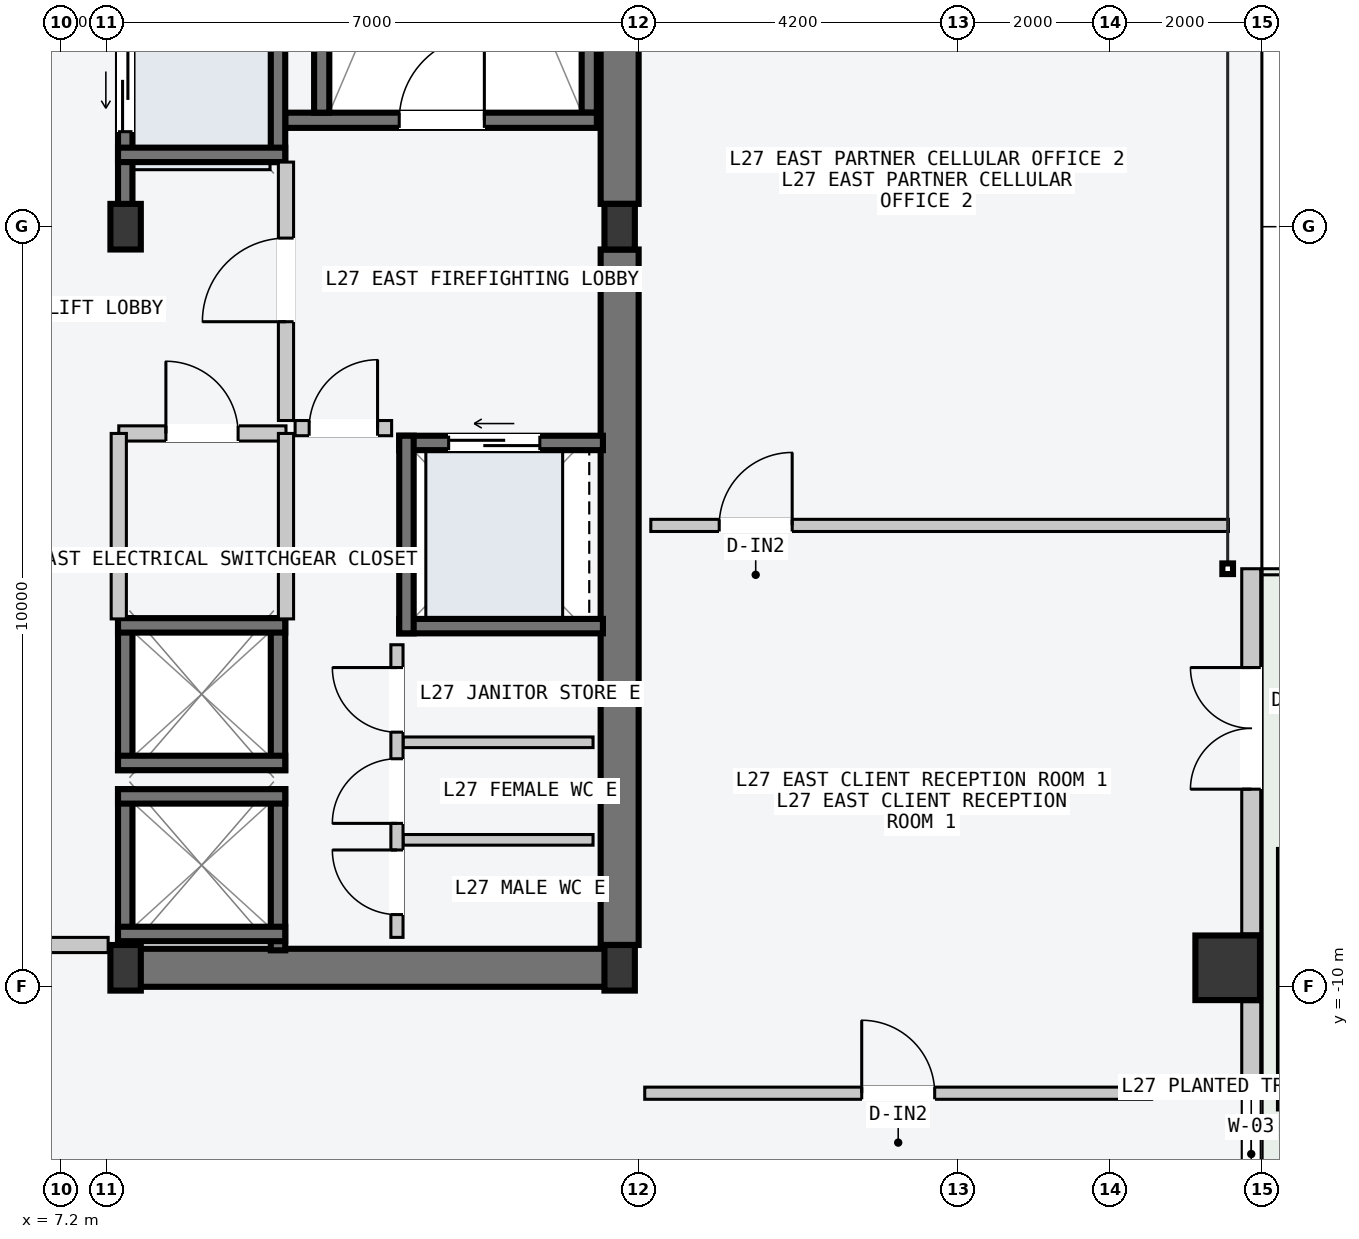
"""IFC4 building model, lengths in metres.
Left out: names, types, materials, properties, quantities, classifications, styles, units other than length and angle.
Written with IfcOpenShell. Run it as: python <this file> out.ifc"""

import sys

from ifc_helpers import new_model, si_unit, direction, frame, frame_2d, origin, origin_2d, place, context, subcontext, project, spatial, rectangle, hollow_rectangle, i_section, extrude, element, fill, save


model = new_model("IFC4")
c1 = context("Model", 3, precision=1e-05, world=origin(), true_north=direction((0.0, 1.0)))
c2 = subcontext(c1, "Body", "Model", "MODEL_VIEW")
j1 = project(units=[si_unit("LENGTHUNIT", "METRE"), si_unit("PLANEANGLEUNIT", "RADIAN")], contexts=[c1])
p1 = place(None, origin())
s1 = spatial("IfcSite", under=j1, at=p1, CompositionType="ELEMENT")
p2 = place(p1, origin())
s2 = spatial("IfcBuilding", under=s1, at=p2, CompositionType="ELEMENT")
p3 = place(p2, frame((0.0, 0.0, 106.2)))
s3 = spatial("IfcBuildingStorey", under=s2, at=p3, CompositionType="ELEMENT", Elevation=106.2)
p4 = place(p3, frame((8.07, -9.75, -0.2), z_axis=(0.0, 0.0, 1.0), x_axis=(1.0, 0.0, 0.0)))
e1 = element("IfcWall", 1, at=p4, inside=s3, PredefinedType="SHEAR", context=c2, shape_type="SweptSolid", body=[
    extrude(rectangle(XDim=6.46, YDim=0.5, at=frame_2d((3.23, 0.0))), origin(), (0.0, 0.0, 1.0), 3.6),
])
for number, where, z_axis, x_axis in (
    (2, (14.55, -9.45, -0.2), (0.0, 0.0, 1.0), (0.0, 1.0, 0.0)),
    (3, (14.55, 0.3, -0.2), (0.0, 0.0, 1.0), (0.0, 1.0, 0.0)),
):
    element("IfcWall", number, at=place(p3, frame(where, z_axis=z_axis, x_axis=x_axis)), inside=s3, PredefinedType="SHEAR", context=c2, shape_type="SweptSolid", body=[
        extrude(rectangle(XDim=9.15, YDim=0.5, at=frame_2d((4.575, 0.0))), origin(), (0.0, 0.0, 1.0), 3.6),
    ])
p5 = place(p3, frame((14.15, 1.5, -0.2), z_axis=(0.0, 0.0, 1.0), x_axis=(0.0, 1.0, 0.0)))
e4 = element("IfcWall", 4, at=p5, inside=s3, PredefinedType="SOLIDWALL", context=c2, shape_type="SweptSolid", body=[
    extrude(rectangle(XDim=7.8, YDim=0.2, at=frame_2d((3.9, 0.0))), origin(), (0.0, 0.0, 1.0), 3.6),
])
p6 = place(p3, frame((10.15, 1.4, -0.2), z_axis=(0.0, 0.0, 1.0), x_axis=(1.0, 0.0, 0.0)))
e5 = element("IfcWall", 5, at=p6, inside=s3, PredefinedType="SOLIDWALL", context=c2, shape_type="SweptSolid", body=[
    extrude(rectangle(XDim=4.1, YDim=0.2, at=frame_2d((2.05, 0.0))), origin(), (0.0, 0.0, 1.0), 3.6),
])
p7 = place(p6, frame((1.5, 0.0, 0.2)))
e6 = element("IfcOpeningElement", 6, at=p7, cuts=e5, PredefinedType="OPENING", context=c2, shape_type="SweptSolid", body=[
    extrude(rectangle(XDim=1.12, YDim=2.18, at=frame_2d((0.56, 1.09))), frame((0.0, 0.11, 0.0), z_axis=(0.0, -1.0, 0.0), x_axis=(1.0, 0.0, 0.0)), (0.0, 0.0, 1.0), 0.22),
])
p8 = place(p3, frame((10.63, 1.5, -0.2), z_axis=(0.0, 0.0, 1.0), x_axis=(0.0, 1.0, 0.0)))
e7 = element("IfcWall", 7, at=p8, inside=s3, PredefinedType="SOLIDWALL", context=c2, shape_type="SweptSolid", body=[
    extrude(rectangle(XDim=7.8, YDim=0.2, at=frame_2d((3.9, 0.0))), origin(), (0.0, 0.0, 1.0), 3.6),
])
for number, where, z_axis, x_axis in (
    (8, (8.05, -9.75, 0.0), (0.0, 0.0, 1.0), (1.0, 0.0, 0.0)),
    (9, (8.05, 0.0, 0.0), (0.0, 0.0, 1.0), (1.0, 0.0, 0.0)),
    (10, (14.55, -9.75, 0.0), (0.0, 0.0, 1.0), (1.0, 0.0, 0.0)),
    (11, (14.55, 0.0, 0.0), (0.0, 0.0, 1.0), (1.0, 0.0, 0.0)),
):
    element("IfcColumn", number, at=place(p3, frame(where, z_axis=z_axis, x_axis=x_axis)), inside=s3, PredefinedType="COLUMN", context=c2, shape_type="SweptSolid", body=[
        extrude(i_section(OverallWidth=0.4, OverallDepth=0.6, WebThickness=0.022, FlangeThickness=0.036, at=origin_2d()), origin(), (0.0, 0.0, 1.0), 3.6),
    ])
p9 = place(p3, frame((22.55, -9.75, 0.0), z_axis=(0.0, 0.0, 1.0), x_axis=(0.0, 1.0, 0.0)))
e12 = element("IfcColumn", 12, at=p9, inside=s3, PredefinedType="COLUMN", context=c2, shape_type="SweptSolid", body=[
    extrude(hollow_rectangle(XDim=0.85, YDim=0.85, WallThickness=0.04, at=origin_2d()), origin(), (0.0, 0.0, 1.0), 3.6),
])
p10 = place(p3, frame((22.86, -14.605, 0.0), z_axis=(0.0, 0.0, 1.0), x_axis=(0.0, 1.0, 0.0)))
e13 = element("IfcWall", 13, at=p10, inside=s3, PredefinedType="STANDARD", context=c2, shape_type="SweptSolid", body=[
    extrude(rectangle(XDim=4.41, YDim=0.25, at=frame_2d((2.205, 0.0))), origin(), (0.0, 0.0, 1.0), 3.4),
])
p11 = place(p10, frame((1.405, 0.0, 0.85)))
e14 = element("IfcOpeningElement", 14, at=p11, cuts=e13, PredefinedType="OPENING", context=c2, shape_type="SweptSolid", body=[
    extrude(rectangle(XDim=2.0, YDim=2.1, at=frame_2d((1.0, 1.05))), frame((0.0, 0.135, 0.0), z_axis=(0.0, -1.0, 0.0), x_axis=(1.0, 0.0, 0.0)), (0.0, 0.0, 1.0), 0.27),
])
p12 = place(p3, frame((22.86, -9.305, 0.0), z_axis=(0.0, 0.0, 1.0), x_axis=(0.0, 1.0, 0.0)))
e15 = element("IfcWall", 15, at=p12, inside=s3, PredefinedType="STANDARD", context=c2, shape_type="SweptSolid", body=[
    extrude(rectangle(XDim=4.805, YDim=0.25, at=frame_2d((2.402, 0.0))), origin(), (0.0, 0.0, 1.0), 3.4),
])
p13 = place(p12, frame((1.905, 0.0, 0.0)))
e16 = element("IfcOpeningElement", 16, at=p13, cuts=e15, PredefinedType="OPENING", context=c2, shape_type="SweptSolid", body=[
    extrude(rectangle(XDim=1.6, YDim=2.2, at=frame_2d((0.8, 1.1))), frame((0.0, 0.135, 0.0), z_axis=(0.0, -1.0, 0.0), x_axis=(1.0, 0.0, 0.0)), (0.0, 0.0, 1.0), 0.27),
])
p14 = place(p3, frame((8.045, 0.21, -0.2), z_axis=(0.0, 0.0, 1.0), x_axis=(0.0, 1.0, 0.0)))
e17 = element("IfcWall", 17, at=p14, inside=s3, PredefinedType="SOLIDWALL", context=c2, shape_type="SweptSolid", body=[
    extrude(rectangle(XDim=2.54, YDim=0.19, at=frame_2d((1.27, 0.0))), origin(), (0.0, 0.0, 1.0), 3.6),
])
p15 = place(p14, frame((1.04, 0.0, 0.2)))
e18 = element("IfcOpeningElement", 18, at=p15, cuts=e17, PredefinedType="OPENING", context=c2, shape_type="SweptSolid", body=[
    extrude(rectangle(XDim=1.1, YDim=2.2, at=frame_2d((0.55, 1.1))), frame((0.0, 0.105, 0.0), z_axis=(0.0, -1.0, 0.0), x_axis=(1.0, 0.0, 0.0)), (0.0, 0.0, 1.0), 0.21),
])
p16 = place(p3, frame((10.055, 0.85, -0.2), z_axis=(0.0, 0.0, 1.0), x_axis=(0.0, 1.0, 0.0)))
e19 = element("IfcWall", 19, at=p16, inside=s3, PredefinedType="SOLIDWALL", context=c2, shape_type="SweptSolid", body=[
    extrude(rectangle(XDim=1.9, YDim=0.19, at=frame_2d((0.95, 0.0))), origin(), (0.0, 0.0, 1.0), 3.6),
])
p17 = place(p3, frame((7.95, 0.945, -0.2), z_axis=(0.0, 0.0, 1.0), x_axis=(1.0, 0.0, 0.0)))
e20 = element("IfcWall", 20, at=p17, inside=s3, PredefinedType="SOLIDWALL", context=c2, shape_type="SweptSolid", body=[
    extrude(rectangle(XDim=2.2, YDim=0.19, at=frame_2d((1.1, 0.0))), origin(), (0.0, 0.0, 1.0), 3.6),
])
for number, where, z_axis, x_axis in (
    (21, (8.045, -9.52, -0.2), (0.0, 0.0, 1.0), (0.0, 1.0, 0.0)),
    (22, (10.055, -9.52, -0.2), (0.0, 0.0, 1.0), (0.0, 1.0, 0.0)),
):
    element("IfcWall", number, at=place(p3, frame(where, z_axis=z_axis, x_axis=x_axis)), inside=s3, PredefinedType="SOLIDWALL", context=c2, shape_type="SweptSolid", body=[
        extrude(rectangle(XDim=2.12, YDim=0.19, at=frame_2d((1.06, 0.0))), origin(), (0.0, 0.0, 1.0), 3.6),
    ])
for number, where, z_axis, x_axis in (
    (23, (7.95, -7.495, -0.2), (0.0, 0.0, 1.0), (1.0, 0.0, 0.0)),
    (24, (7.95, -9.305, -0.2), (0.0, 0.0, 1.0), (1.0, 0.0, 0.0)),
):
    element("IfcWall", number, at=place(p3, frame(where, z_axis=z_axis, x_axis=x_axis)), inside=s3, PredefinedType="SOLIDWALL", context=c2, shape_type="SweptSolid", body=[
        extrude(rectangle(XDim=2.2, YDim=0.19, at=frame_2d((1.1, 0.0))), origin(), (0.0, 0.0, 1.0), 3.6),
    ])
for number, where, z_axis, x_axis in (
    (25, (8.045, -7.15, -0.2), (0.0, 0.0, 1.0), (0.0, 1.0, 0.0)),
    (26, (10.055, -7.15, -0.2), (0.0, 0.0, 1.0), (0.0, 1.0, 0.0)),
):
    element("IfcWall", number, at=place(p3, frame(where, z_axis=z_axis, x_axis=x_axis)), inside=s3, PredefinedType="SOLIDWALL", context=c2, shape_type="SweptSolid", body=[
        extrude(rectangle(XDim=2.0, YDim=0.19, at=frame_2d((1.0, 0.0))), origin(), (0.0, 0.0, 1.0), 3.6),
    ])
for number, where, z_axis, x_axis in (
    (27, (7.95, -5.245, -0.2), (0.0, 0.0, 1.0), (1.0, 0.0, 0.0)),
    (28, (7.95, -7.055, -0.2), (0.0, 0.0, 1.0), (1.0, 0.0, 0.0)),
):
    element("IfcWall", number, at=place(p3, frame(where, z_axis=z_axis, x_axis=x_axis)), inside=s3, PredefinedType="SOLIDWALL", context=c2, shape_type="SweptSolid", body=[
        extrude(rectangle(XDim=2.2, YDim=0.19, at=frame_2d((1.1, 0.0))), origin(), (0.0, 0.0, 1.0), 3.6),
    ])
p18 = place(p3, frame((11.65, -2.845, -0.2), z_axis=(0.0, 0.0, 1.0), x_axis=(1.0, 0.0, 0.0)))
e29 = element("IfcWall", 29, at=p18, inside=s3, PredefinedType="SOLIDWALL", context=c2, shape_type="SweptSolid", body=[
    extrude(rectangle(XDim=2.68, YDim=0.19, at=frame_2d((1.34, 0.0))), origin(), (0.0, 0.0, 1.0), 3.6),
])
p19 = place(p18, frame((0.65, 0.0, 0.2)))
e30 = element("IfcOpeningElement", 30, at=p19, cuts=e29, PredefinedType="OPENING", context=c2, shape_type="SweptSolid", body=[
    extrude(rectangle(XDim=1.2, YDim=2.2, at=frame_2d((0.6, 1.1))), frame((0.0, 0.105, 0.0), z_axis=(0.0, -1.0, 0.0), x_axis=(1.0, 0.0, 0.0)), (0.0, 0.0, 1.0), 0.21),
])
p20 = place(p3, frame((11.65, -5.255, -0.2), z_axis=(0.0, 0.0, 1.0), x_axis=(1.0, 0.0, 0.0)))
e31 = element("IfcWall", 31, at=p20, inside=s3, PredefinedType="SOLIDWALL", context=c2, shape_type="SweptSolid", body=[
    extrude(rectangle(XDim=2.68, YDim=0.19, at=frame_2d((1.34, 0.0))), origin(), (0.0, 0.0, 1.0), 3.6),
])
p21 = place(p3, frame((11.745, -5.35, -0.2), z_axis=(0.0, 0.0, 1.0), x_axis=(0.0, 1.0, 0.0)))
e32 = element("IfcWall", 32, at=p21, inside=s3, PredefinedType="SOLIDWALL", context=c2, shape_type="SweptSolid", body=[
    extrude(rectangle(XDim=2.6, YDim=0.19, at=frame_2d((1.3, 0.0))), origin(), (0.0, 0.0, 1.0), 3.6),
])
p22 = place(p3, frame((6.02, -9.45, 0.0), z_axis=(0.0, 0.0, 1.0), x_axis=(1.0, 0.0, 0.0)))
e33 = element("IfcWall", 33, at=p22, inside=s3, PredefinedType="PARTITIONING", context=c2, shape_type="SweptSolid", body=[
    extrude(rectangle(XDim=1.8, YDim=0.2, at=frame_2d((0.9, 0.0))), origin(), (0.0, 0.0, 1.0), 3.4),
])
p23 = place(p3, frame((10.16, -2.55, 0.0), z_axis=(0.0, 0.0, 1.0), x_axis=(0.0, 1.0, 0.0)))
e34 = element("IfcWall", 34, at=p23, inside=s3, PredefinedType="PARTITIONING", context=c2, shape_type="SweptSolid", body=[
    extrude(rectangle(XDim=3.4, YDim=0.2, at=frame_2d((1.7, 0.0))), origin(), (0.0, 0.0, 1.0), 3.4),
])
p24 = place(p23, frame((1.3, 0.0, 0.0)))
e35 = element("IfcOpeningElement", 35, at=p24, cuts=e34, PredefinedType="OPENING", context=c2, shape_type="SweptSolid", body=[
    extrude(rectangle(XDim=1.1, YDim=2.15, at=frame_2d((0.55, 1.075))), frame((0.0, 0.11, 0.0), z_axis=(0.0, -1.0, 0.0), x_axis=(1.0, 0.0, 0.0)), (0.0, 0.0, 1.0), 0.22),
])
p25 = place(p3, frame((10.28, -2.65, 0.0), z_axis=(0.0, 0.0, 1.0), x_axis=(1.0, 0.0, 0.0)))
e36 = element("IfcWall", 36, at=p25, inside=s3, PredefinedType="PARTITIONING", context=c2, shape_type="SweptSolid", body=[
    extrude(rectangle(XDim=1.27, YDim=0.2, at=frame_2d((0.635, 0.0))), origin(), (0.0, 0.0, 1.0), 3.4),
])
p26 = place(p25, frame((0.185, 0.0, 0.0)))
e37 = element("IfcOpeningElement", 37, at=p26, cuts=e36, PredefinedType="OPENING", context=c2, shape_type="SweptSolid", body=[
    extrude(rectangle(XDim=0.9, YDim=2.15, at=frame_2d((0.45, 1.075))), frame((0.0, 0.11, 0.0), z_axis=(0.0, -1.0, 0.0), x_axis=(1.0, 0.0, 0.0)), (0.0, 0.0, 1.0), 0.22),
])
p27 = place(p3, frame((7.96, -2.72, 0.0), z_axis=(0.0, 0.0, 1.0), x_axis=(1.0, 0.0, 0.0)))
e38 = element("IfcWall", 38, at=p27, inside=s3, PredefinedType="PARTITIONING", context=c2, shape_type="SweptSolid", body=[
    extrude(rectangle(XDim=2.2, YDim=0.2, at=frame_2d((1.1, 0.0))), origin(), (0.0, 0.0, 1.0), 3.4),
])
p28 = place(p27, frame((0.62, 0.0, 0.0)))
e39 = element("IfcOpeningElement", 39, at=p28, cuts=e38, PredefinedType="OPENING", context=c2, shape_type="SweptSolid", body=[
    extrude(rectangle(XDim=0.95, YDim=2.1, at=frame_2d((0.475, 1.05))), frame((0.0, 0.11, 0.0), z_axis=(0.0, -1.0, 0.0), x_axis=(1.0, 0.0, 0.0)), (0.0, 0.0, 1.0), 0.22),
])
for number, where, z_axis, x_axis in (
    (40, (7.96, -5.16, 0.0), (0.0, 0.0, 1.0), (0.0, 1.0, 0.0)),
    (41, (10.16, -5.16, 0.0), (0.0, 0.0, 1.0), (0.0, 1.0, 0.0)),
):
    element("IfcWall", number, at=place(p3, frame(where, z_axis=z_axis, x_axis=x_axis)), inside=s3, PredefinedType="PARTITIONING", context=c2, shape_type="SweptSolid", body=[
        extrude(rectangle(XDim=2.44, YDim=0.2, at=frame_2d((1.22, 0.0))), origin(), (0.0, 0.0, 1.0), 3.4),
    ])
for number, where, z_axis, x_axis in (
    (42, (11.7, -8.067, 0.0), (0.0, 0.0, 1.0), (1.0, 0.0, 0.0)),
    (43, (11.7, -6.783, 0.0), (0.0, 0.0, 1.0), (1.0, 0.0, 0.0)),
):
    element("IfcWall", number, at=place(p3, frame(where, z_axis=z_axis, x_axis=x_axis)), inside=s3, PredefinedType="PARTITIONING", context=c2, shape_type="SweptSolid", body=[
        extrude(rectangle(XDim=2.5, YDim=0.14, at=frame_2d((1.25, 0.0))), origin(), (0.0, 0.0, 1.0), 3.4),
    ])
p29 = place(p3, frame((11.62, -9.35, 0.0), z_axis=(0.0, 0.0, 1.0), x_axis=(0.0, 1.0, 0.0)))
e44 = element("IfcWall", 44, at=p29, inside=s3, PredefinedType="PARTITIONING", context=c2, shape_type="SweptSolid", body=[
    extrude(rectangle(XDim=3.85, YDim=0.16, at=frame_2d((1.925, 0.0))), origin(), (0.0, 0.0, 1.0), 3.4),
])
p30 = place(p29, frame((0.3, 0.0, 0.0)))
e45 = element("IfcOpeningElement", 45, at=p30, cuts=e44, PredefinedType="OPENING", context=c2, shape_type="SweptSolid", body=[
    extrude(rectangle(XDim=0.85, YDim=2.12, at=frame_2d((0.425, 1.06))), frame((0.0, 0.09, 0.0), z_axis=(0.0, -1.0, 0.0), x_axis=(1.0, 0.0, 0.0)), (0.0, 0.0, 1.0), 0.18),
])
p31 = place(p29, frame((1.5, 0.0, 0.0)))
e46 = element("IfcOpeningElement", 46, at=p31, cuts=e44, PredefinedType="OPENING", context=c2, shape_type="SweptSolid", body=[
    extrude(rectangle(XDim=0.85, YDim=2.12, at=frame_2d((0.425, 1.06))), frame((0.0, 0.09, 0.0), z_axis=(0.0, -1.0, 0.0), x_axis=(1.0, 0.0, 0.0)), (0.0, 0.0, 1.0), 0.18),
])
p32 = place(p29, frame((2.7, 0.0, 0.0)))
e47 = element("IfcOpeningElement", 47, at=p32, cuts=e44, PredefinedType="OPENING", context=c2, shape_type="SweptSolid", body=[
    extrude(rectangle(XDim=0.85, YDim=2.12, at=frame_2d((0.425, 1.06))), frame((0.0, 0.09, 0.0), z_axis=(0.0, -1.0, 0.0), x_axis=(1.0, 0.0, 0.0)), (0.0, 0.0, 1.0), 0.18),
])
p33 = place(p3, frame((14.88, -11.4, 0.0), z_axis=(0.0, 0.0, 1.0), x_axis=(1.0, 0.0, 0.0)))
e48 = element("IfcWall", 48, at=p33, inside=s3, PredefinedType="PARTITIONING", context=c2, shape_type="SweptSolid", body=[
    extrude(rectangle(XDim=6.67, YDim=0.16, at=frame_2d((3.335, 0.0))), origin(), (0.0, 0.0, 1.0), 3.4),
])
p34 = place(p33, frame((2.855, 0.0, 0.0)))
e49 = element("IfcOpeningElement", 49, at=p34, cuts=e48, PredefinedType="OPENING", context=c2, shape_type="SweptSolid", body=[
    extrude(rectangle(XDim=0.96, YDim=2.18, at=frame_2d((0.48, 1.09))), frame((0.0, 0.09, 0.0), z_axis=(0.0, -1.0, 0.0), x_axis=(1.0, 0.0, 0.0)), (0.0, 0.0, 1.0), 0.18),
])
p35 = place(p3, frame((14.96, -3.93, 0.0), z_axis=(0.0, 0.0, 1.0), x_axis=(1.0, 0.0, 0.0)))
e50 = element("IfcWall", 50, at=p35, inside=s3, PredefinedType="PARTITIONING", context=c2, shape_type="SweptSolid", body=[
    extrude(rectangle(XDim=7.6, YDim=0.16, at=frame_2d((3.8, 0.0))), origin(), (0.0, 0.0, 1.0), 3.4),
])
p36 = place(p35, frame((0.9, 0.0, 0.0)))
e51 = element("IfcOpeningElement", 51, at=p36, cuts=e50, PredefinedType="OPENING", context=c2, shape_type="SweptSolid", body=[
    extrude(rectangle(XDim=0.96, YDim=2.18, at=frame_2d((0.48, 1.09))), frame((0.0, 0.09, 0.0), z_axis=(0.0, -1.0, 0.0), x_axis=(1.0, 0.0, 0.0)), (0.0, 0.0, 1.0), 0.18),
])
p37 = place(p7, origin())
e52 = element("IfcDoor", 52, at=p37, inside=s3, OperationType="SINGLE_SWING_RIGHT", PredefinedType="DOOR", context=c2, shape_type="SweptSolid", body=[
    extrude(rectangle(XDim=1.12, YDim=2.18, at=frame_2d((0.56, 1.09))), frame((0.0, 0.025, 0.0), z_axis=(0.0, -1.0, 0.0), x_axis=(1.0, 0.0, 0.0)), (0.0, 0.0, 1.0), 0.05),
])
fill(e6, e52)
p38 = place(p11, origin())
e53 = element("IfcWindow", 53, at=p38, inside=s3, PartitioningType="SINGLE_PANEL", PredefinedType="WINDOW", context=c2, shape_type="SweptSolid", body=[
    extrude(rectangle(XDim=2.0, YDim=2.1, at=frame_2d((1.0, 1.05))), frame((0.0, 0.03, 0.0), z_axis=(0.0, -1.0, 0.0), x_axis=(1.0, 0.0, 0.0)), (0.0, 0.0, 1.0), 0.06),
])
fill(e14, e53)
p39 = place(p13, origin())
e54 = element("IfcDoor", 54, at=p39, inside=s3, OperationType="DOUBLE_DOOR_SINGLE_SWING", PredefinedType="DOOR", context=c2, shape_type="SweptSolid", body=[
    extrude(rectangle(XDim=1.6, YDim=2.2, at=frame_2d((0.8, 1.1))), frame((0.0, 0.025, 0.0), z_axis=(0.0, -1.0, 0.0), x_axis=(1.0, 0.0, 0.0)), (0.0, 0.0, 1.0), 0.05),
])
fill(e16, e54)
p40 = place(p15, origin())
e55 = element("IfcDoor", 55, at=p40, inside=s3, OperationType="SLIDING_TO_LEFT", PredefinedType="DOOR", context=c2, shape_type="SweptSolid", body=[
    extrude(rectangle(XDim=1.1, YDim=2.2, at=frame_2d((0.55, 1.1))), frame((0.0, 0.025, 0.0), z_axis=(0.0, -1.0, 0.0), x_axis=(1.0, 0.0, 0.0)), (0.0, 0.0, 1.0), 0.05),
])
fill(e18, e55)
p41 = place(p19, origin())
e56 = element("IfcDoor", 56, at=p41, inside=s3, OperationType="SLIDING_TO_LEFT", PredefinedType="DOOR", context=c2, shape_type="SweptSolid", body=[
    extrude(rectangle(XDim=1.2, YDim=2.2, at=frame_2d((0.6, 1.1))), frame((0.0, 0.025, 0.0), z_axis=(0.0, -1.0, 0.0), x_axis=(1.0, 0.0, 0.0)), (0.0, 0.0, 1.0), 0.05),
])
fill(e30, e56)
p42 = place(p24, origin())
e57 = element("IfcDoor", 57, at=p42, inside=s3, OperationType="SINGLE_SWING_LEFT", PredefinedType="DOOR", context=c2, shape_type="SweptSolid", body=[
    extrude(rectangle(XDim=1.1, YDim=2.15, at=frame_2d((0.55, 1.075))), frame((0.0, 0.025, 0.0), z_axis=(0.0, -1.0, 0.0), x_axis=(1.0, 0.0, 0.0)), (0.0, 0.0, 1.0), 0.05),
])
fill(e35, e57)
p43 = place(p26, origin())
e58 = element("IfcDoor", 58, at=p43, inside=s3, OperationType="SINGLE_SWING_RIGHT", PredefinedType="DOOR", context=c2, shape_type="SweptSolid", body=[
    extrude(rectangle(XDim=0.9, YDim=2.15, at=frame_2d((0.45, 1.075))), frame((0.0, 0.025, 0.0), z_axis=(0.0, -1.0, 0.0), x_axis=(1.0, 0.0, 0.0)), (0.0, 0.0, 1.0), 0.05),
])
fill(e37, e58)
p44 = place(p28, origin())
e59 = element("IfcDoor", 59, at=p44, inside=s3, OperationType="SINGLE_SWING_LEFT", PredefinedType="DOOR", context=c2, shape_type="SweptSolid", body=[
    extrude(rectangle(XDim=0.95, YDim=2.1, at=frame_2d((0.475, 1.05))), frame((0.0, 0.025, 0.0), z_axis=(0.0, -1.0, 0.0), x_axis=(1.0, 0.0, 0.0)), (0.0, 0.0, 1.0), 0.05),
])
fill(e39, e59)
p45 = place(p30, origin())
e60 = element("IfcDoor", 60, at=p45, inside=s3, OperationType="SINGLE_SWING_RIGHT", PredefinedType="DOOR", context=c2, shape_type="SweptSolid", body=[
    extrude(rectangle(XDim=0.85, YDim=2.12, at=frame_2d((0.425, 1.06))), frame((0.0, 0.025, 0.0), z_axis=(0.0, -1.0, 0.0), x_axis=(1.0, 0.0, 0.0)), (0.0, 0.0, 1.0), 0.05),
])
fill(e45, e60)
p46 = place(p31, origin())
e61 = element("IfcDoor", 61, at=p46, inside=s3, OperationType="SINGLE_SWING_LEFT", PredefinedType="DOOR", context=c2, shape_type="SweptSolid", body=[
    extrude(rectangle(XDim=0.85, YDim=2.12, at=frame_2d((0.425, 1.06))), frame((0.0, 0.025, 0.0), z_axis=(0.0, -1.0, 0.0), x_axis=(1.0, 0.0, 0.0)), (0.0, 0.0, 1.0), 0.05),
])
fill(e46, e61)
p47 = place(p32, origin())
e62 = element("IfcDoor", 62, at=p47, inside=s3, OperationType="SINGLE_SWING_RIGHT", PredefinedType="DOOR", context=c2, shape_type="SweptSolid", body=[
    extrude(rectangle(XDim=0.85, YDim=2.12, at=frame_2d((0.425, 1.06))), frame((0.0, 0.025, 0.0), z_axis=(0.0, -1.0, 0.0), x_axis=(1.0, 0.0, 0.0)), (0.0, 0.0, 1.0), 0.05),
])
fill(e47, e62)
p48 = place(p34, origin())
e63 = element("IfcDoor", 63, at=p48, inside=s3, OperationType="SINGLE_SWING_LEFT", PredefinedType="DOOR", context=c2, shape_type="SweptSolid", body=[
    extrude(rectangle(XDim=0.96, YDim=2.18, at=frame_2d((0.48, 1.09))), frame((0.0, 0.025, 0.0), z_axis=(0.0, -1.0, 0.0), x_axis=(1.0, 0.0, 0.0)), (0.0, 0.0, 1.0), 0.05),
])
fill(e49, e63)
p49 = place(p36, origin())
e64 = element("IfcDoor", 64, at=p49, inside=s3, OperationType="SINGLE_SWING_RIGHT", PredefinedType="DOOR", context=c2, shape_type="SweptSolid", body=[
    extrude(rectangle(XDim=0.96, YDim=2.18, at=frame_2d((0.48, 1.09))), frame((0.0, 0.025, 0.0), z_axis=(0.0, -1.0, 0.0), x_axis=(1.0, 0.0, 0.0)), (0.0, 0.0, 1.0), 0.05),
])
fill(e51, e64)
save(model, sys.argv[1])
